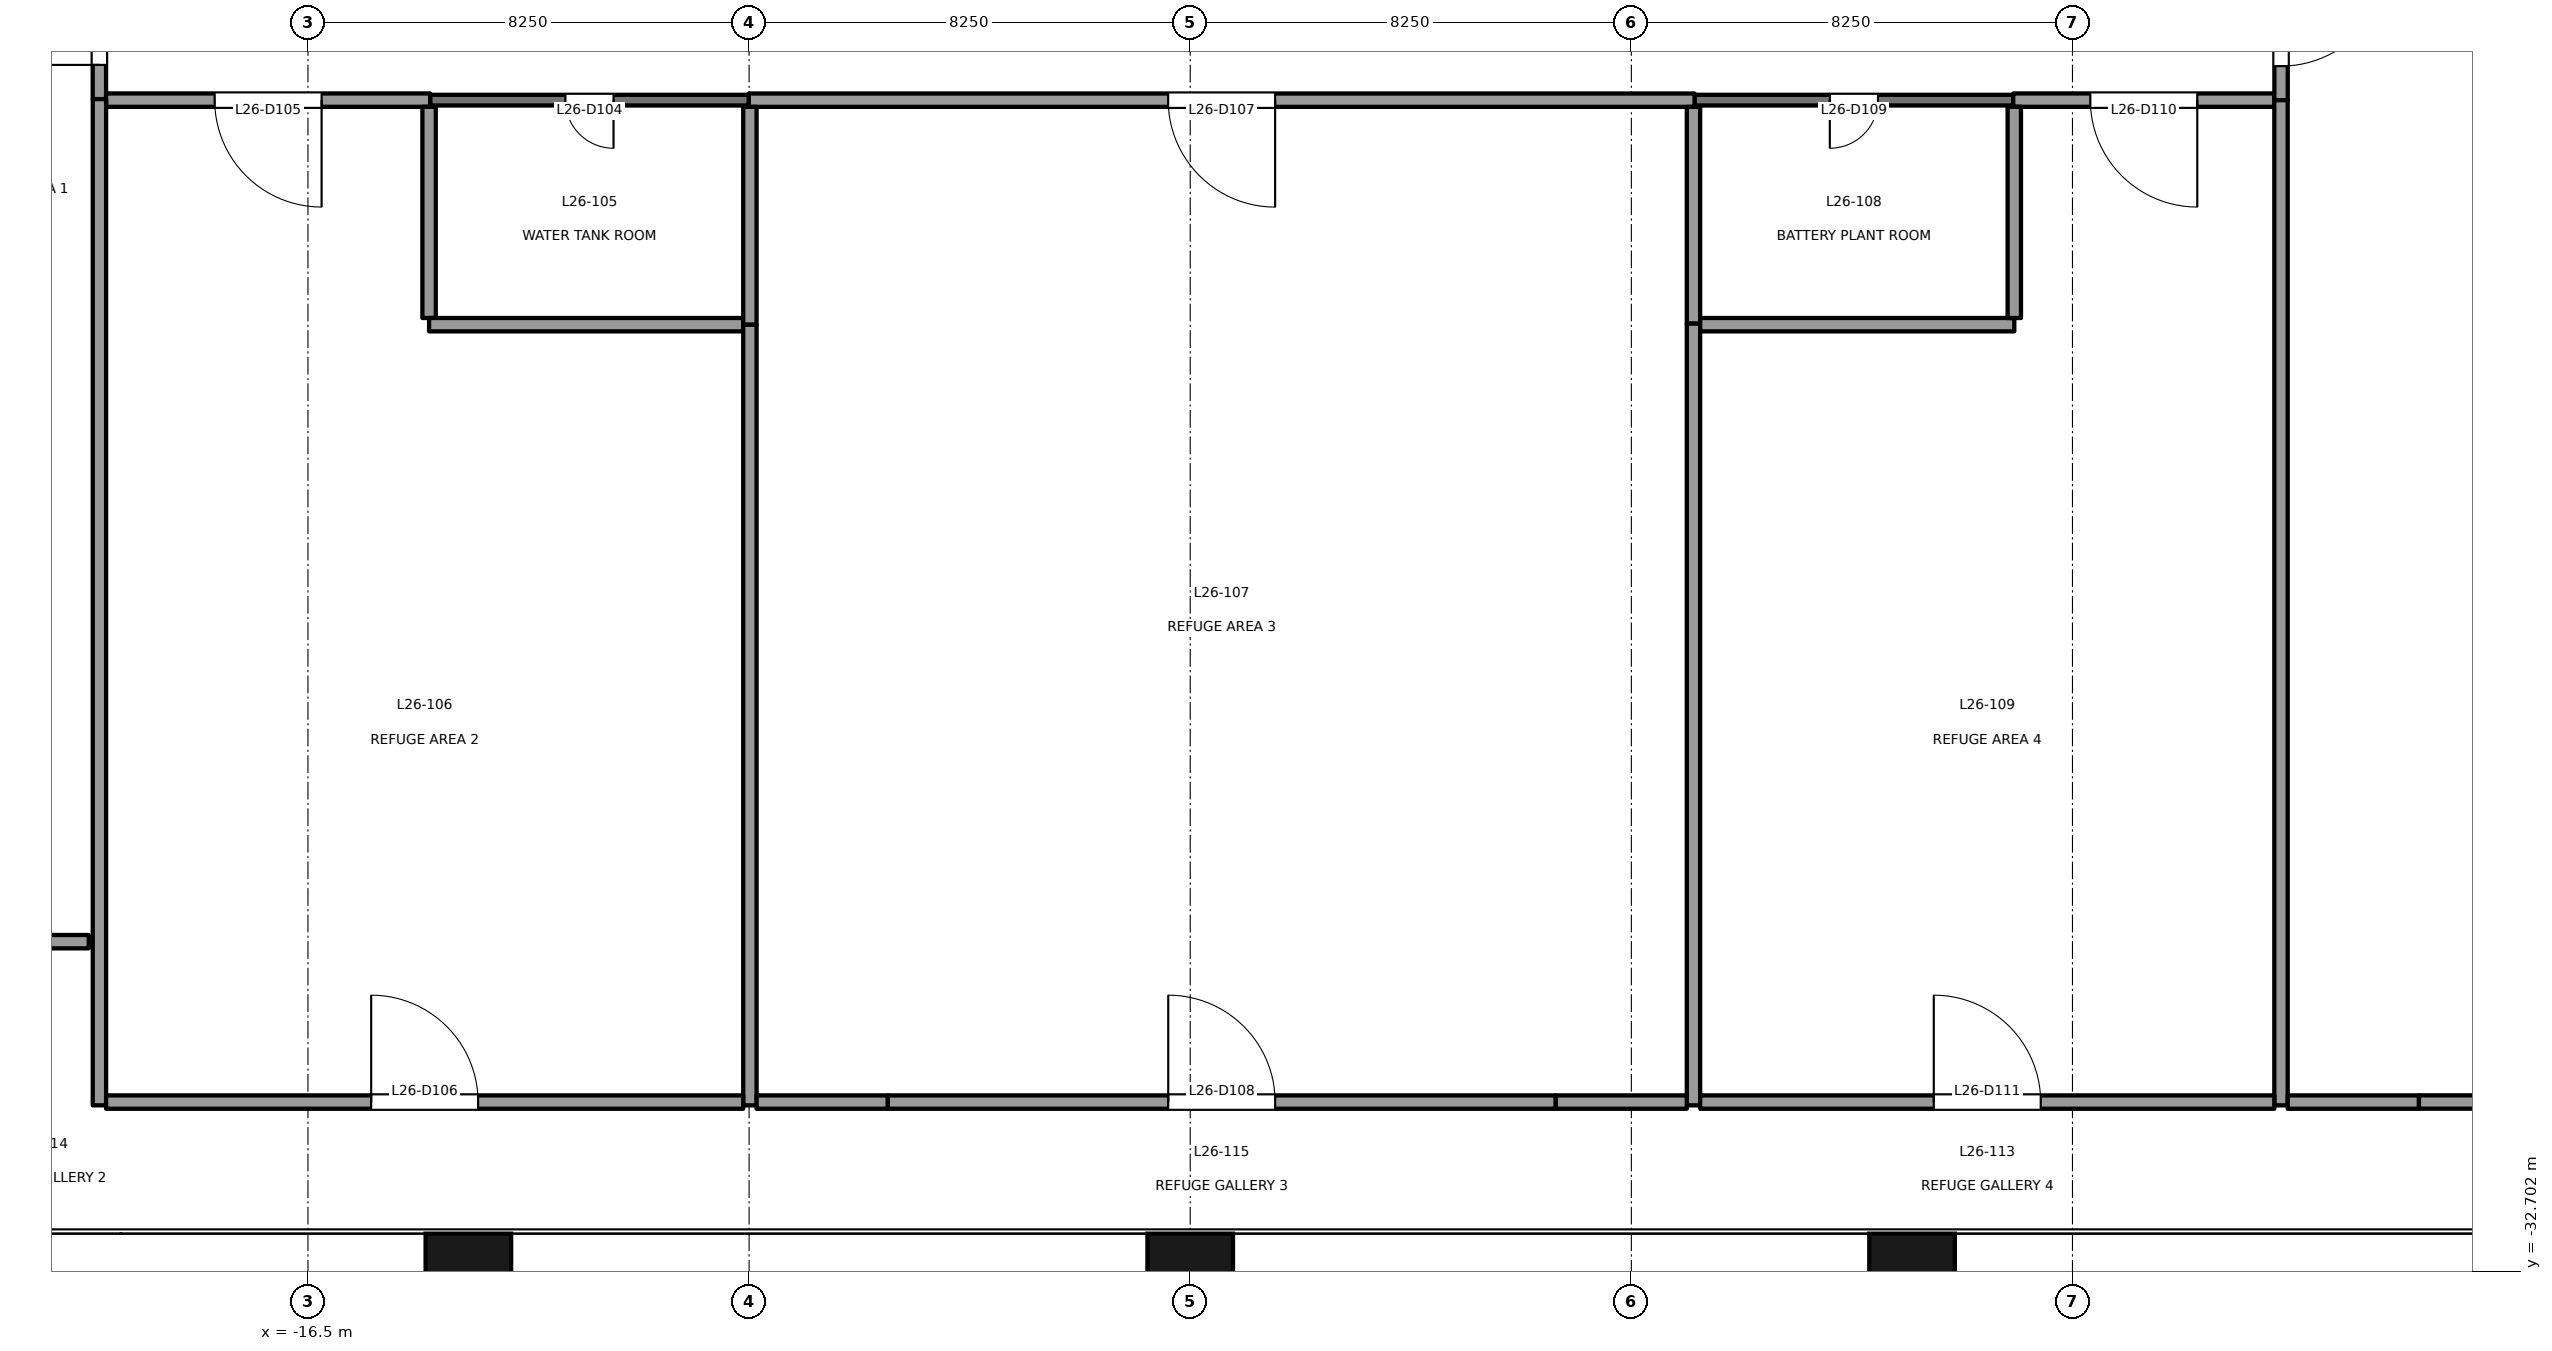
"""IFC4 building model, lengths in metres.
Left out: names, types, materials, properties, quantities, classifications, styles, units other than length and angle.
Written with IfcOpenShell. Run it as: python <this file> out.ifc"""

import sys

from ifc_helpers import new_model, si_unit, direction, frame, frame_2d, origin, origin_2d, place, context, subcontext, project, spatial, rectangle, extrude, element, fill, save


model = new_model("IFC4")
c1 = context("Model", 3, precision=1e-05, world=origin(), true_north=direction((0.0, 1.0)))
c2 = subcontext(c1, "Body", "Model", "MODEL_VIEW")
j1 = project(units=[si_unit("LENGTHUNIT", "METRE"), si_unit("PLANEANGLEUNIT", "RADIAN")], contexts=[c1])
p1 = place(None, origin())
s1 = spatial("IfcSite", under=j1, at=p1, CompositionType="ELEMENT")
p2 = place(p1, origin())
s2 = spatial("IfcBuilding", under=s1, at=p2, CompositionType="ELEMENT")
p3 = place(p2, frame((0.0, 0.0, 115.7)))
s3 = spatial("IfcBuildingStorey", under=s2, at=p3, CompositionType="ELEMENT", Elevation=115.7)
for number, where, z_axis, x_axis in (
    (1, (-13.5, -32.9, -0.2), (0.0, 0.0, 1.0), (1.0, 0.0, 0.0)),
    (2, (0.0, -32.9, -0.2), (0.0, 0.0, 1.0), (1.0, 0.0, 0.0)),
    (3, (13.5, -32.9, -0.2), (0.0, 0.0, 1.0), (1.0, 0.0, 0.0)),
):
    element("IfcColumn", number, at=place(p3, frame(where, z_axis=z_axis, x_axis=x_axis)), inside=s3, PredefinedType="COLUMN", context=c2, shape_type="SweptSolid", body=[
        extrude(rectangle(XDim=1.6, YDim=1.8, at=origin_2d()), origin(), (0.0, 0.0, 1.0), 5.0),
    ])
p4 = place(p3, frame((-20.401, -10.78, 0.0), z_axis=(0.0, 0.0, 1.0), x_axis=(0.0, 1.0, 0.0)))
e4 = element("IfcWall", 4, at=p4, inside=s3, PredefinedType="PARTITIONING", context=c2, shape_type="SweptSolid", body=[
    extrude(rectangle(XDim=3.28, YDim=0.25, at=frame_2d((1.64, 0.0))), origin(), (0.0, 0.0, 1.0), 4.8),
])
p5 = place(p4, frame((0.64, 0.0, 0.0)))
e5 = element("IfcOpeningElement", 5, at=p5, cuts=e4, PredefinedType="OPENING", context=c2, shape_type="SweptSolid", body=[
    extrude(rectangle(XDim=2.0, YDim=2.1, at=frame_2d((1.0, 1.05))), frame((0.0, 0.135, 0.0), z_axis=(0.0, -1.0, 0.0), x_axis=(1.0, 0.0, 0.0)), (0.0, 0.0, 1.0), 0.271),
])
p6 = place(p3, frame((-8.255, -10.799, 0.0), z_axis=(0.0, 0.0, 1.0), x_axis=(-1.0, 0.0, 0.0)))
e6 = element("IfcWall", 6, at=p6, inside=s3, PredefinedType="PARTITIONING", context=c2, shape_type="SweptSolid", body=[
    extrude(rectangle(XDim=5.96, YDim=0.2, at=frame_2d((2.98, 0.0))), origin(), (0.0, 0.0, 1.0), 3.9),
])
p7 = place(p6, frame((2.53, 0.0, 0.0)))
e7 = element("IfcOpeningElement", 7, at=p7, cuts=e6, PredefinedType="OPENING", context=c2, shape_type="SweptSolid", body=[
    extrude(rectangle(XDim=0.9, YDim=2.1, at=frame_2d((0.45, 1.05))), frame((0.0, 0.111, 0.0), z_axis=(0.0, -1.0, 0.0), x_axis=(1.0, 0.0, 0.0)), (0.0, 0.0, 1.0), 0.221),
])
p8 = place(p3, frame((-14.215, -10.799, 0.0), z_axis=(0.0, 0.0, 1.0), x_axis=(-1.0, 0.0, 0.0)))
e8 = element("IfcWall", 8, at=p8, inside=s3, PredefinedType="PARTITIONING", context=c2, shape_type="SweptSolid", body=[
    extrude(rectangle(XDim=6.06, YDim=0.25, at=frame_2d((3.03, 0.0))), origin(), (0.0, 0.0, 1.0), 4.8),
])
p9 = place(p8, frame((2.03, 0.0, 0.0)))
e9 = element("IfcOpeningElement", 9, at=p9, cuts=e8, PredefinedType="OPENING", context=c2, shape_type="SweptSolid", body=[
    extrude(rectangle(XDim=2.0, YDim=2.1, at=frame_2d((1.0, 1.05))), frame((0.0, 0.135, 0.0), z_axis=(0.0, -1.0, 0.0), x_axis=(1.0, 0.0, 0.0)), (0.0, 0.0, 1.0), 0.271),
])
p10 = place(p3, frame((9.432, -10.8, 0.0), z_axis=(0.0, 0.0, 1.0), x_axis=(-1.0, 0.0, 0.0)))
e10 = element("IfcWall", 10, at=p10, inside=s3, PredefinedType="PARTITIONING", context=c2, shape_type="SweptSolid", body=[
    extrude(rectangle(XDim=17.687, YDim=0.25, at=frame_2d((8.843, 0.0))), origin(), (0.0, 0.0, 1.0), 3.9),
])
p11 = place(p10, frame((7.844, 0.0, 0.0)))
e11 = element("IfcOpeningElement", 11, at=p11, cuts=e10, PredefinedType="OPENING", context=c2, shape_type="SweptSolid", body=[
    extrude(rectangle(XDim=2.0, YDim=2.1, at=frame_2d((1.0, 1.05))), frame((0.0, 0.135, 0.0), z_axis=(0.0, -1.0, 0.0), x_axis=(1.0, 0.0, 0.0)), (0.0, 0.0, 1.0), 0.271),
])
p12 = place(p3, frame((15.392, -10.799, 0.0), z_axis=(0.0, 0.0, 1.0), x_axis=(-1.0, 0.0, 0.0)))
e12 = element("IfcWall", 12, at=p12, inside=s3, PredefinedType="PARTITIONING", context=c2, shape_type="SweptSolid", body=[
    extrude(rectangle(XDim=5.96, YDim=0.2, at=frame_2d((2.98, 0.0))), origin(), (0.0, 0.0, 1.0), 3.9),
])
p13 = place(p12, frame((2.53, 0.0, 0.0)))
e13 = element("IfcOpeningElement", 13, at=p13, cuts=e12, PredefinedType="OPENING", context=c2, shape_type="SweptSolid", body=[
    extrude(rectangle(XDim=0.9, YDim=2.1, at=frame_2d((0.45, 1.05))), frame((0.0, 0.111, 0.0), z_axis=(0.0, -1.0, 0.0), x_axis=(1.0, 0.0, 0.0)), (0.0, 0.0, 1.0), 0.221),
])
p14 = place(p3, frame((20.275, -10.799, 0.0), z_axis=(0.0, 0.0, 1.0), x_axis=(-1.0, 0.0, 0.0)))
e14 = element("IfcWall", 14, at=p14, inside=s3, PredefinedType="PARTITIONING", context=c2, shape_type="SweptSolid", body=[
    extrude(rectangle(XDim=4.883, YDim=0.25, at=frame_2d((2.441, 0.0))), origin(), (0.0, 0.0, 1.0), 2.35),
])
p15 = place(p14, frame((1.441, 0.0, 0.0)))
e15 = element("IfcOpeningElement", 15, at=p15, cuts=e14, PredefinedType="OPENING", context=c2, shape_type="SweptSolid", body=[
    extrude(rectangle(XDim=2.0, YDim=2.1, at=frame_2d((1.0, 1.05))), frame((0.0, 0.135, 0.0), z_axis=(0.0, -1.0, 0.0), x_axis=(1.0, 0.0, 0.0)), (0.0, 0.0, 1.0), 0.271),
])
p16 = place(p3, frame((20.401, -7.526, 0.0), z_axis=(0.0, 0.0, 1.0), x_axis=(0.0, -1.0, 0.0)))
e16 = element("IfcWall", 16, at=p16, inside=s3, PredefinedType="PARTITIONING", context=c2, shape_type="SweptSolid", body=[
    extrude(rectangle(XDim=3.274, YDim=0.25, at=frame_2d((1.637, 0.0))), origin(), (0.0, 0.0, 1.0), 4.3),
])
p17 = place(p16, frame((0.637, 0.0, 0.0)))
e17 = element("IfcOpeningElement", 17, at=p17, cuts=e16, PredefinedType="OPENING", context=c2, shape_type="SweptSolid", body=[
    extrude(rectangle(XDim=2.0, YDim=2.1, at=frame_2d((1.0, 1.05))), frame((0.0, 0.135, 0.0), z_axis=(0.0, -1.0, 0.0), x_axis=(1.0, 0.0, 0.0)), (0.0, 0.0, 1.0), 0.271),
])
p18 = place(p3, frame((-20.4, -10.78, 0.0), z_axis=(0.0, 0.0, 1.0), x_axis=(0.0, -1.0, 0.0)))
e18 = element("IfcWall", 18, at=p18, inside=s3, PredefinedType="PARTITIONING", context=c2, shape_type="SweptSolid", body=[
    extrude(rectangle(XDim=18.82, YDim=0.25, at=frame_2d((9.41, 0.0))), origin(), (0.0, 0.0, 1.0), 4.8),
])
p19 = place(p3, frame((-20.6, -26.539, 0.0), z_axis=(0.0, 0.0, 1.0), x_axis=(-1.0, 0.0, 0.0)))
e19 = element("IfcWall", 19, at=p19, inside=s3, PredefinedType="PARTITIONING", context=c2, shape_type="SweptSolid", body=[
    extrude(rectangle(XDim=1.314, YDim=0.25, at=frame_2d((0.657, 0.0))), origin(), (0.0, 0.0, 1.0), 4.8),
])
p20 = place(p3, frame((-14.235, -14.874, 0.0), z_axis=(0.0, 0.0, 1.0), x_axis=(0.0, 1.0, 0.0)))
e20 = element("IfcWall", 20, at=p20, inside=s3, PredefinedType="PARTITIONING", context=c2, shape_type="SweptSolid", body=[
    extrude(rectangle(XDim=3.95, YDim=0.25, at=frame_2d((1.975, 0.0))), origin(), (0.0, 0.0, 1.0), 4.8),
])
p21 = place(p3, frame((-8.36, -14.999, 0.0), z_axis=(0.0, 0.0, 1.0), x_axis=(-1.0, 0.0, 0.0)))
e21 = element("IfcWall", 21, at=p21, inside=s3, PredefinedType="PARTITIONING", context=c2, shape_type="SweptSolid", body=[
    extrude(rectangle(XDim=5.875, YDim=0.25, at=frame_2d((2.938, 0.0))), origin(), (0.0, 0.0, 1.0), 3.9),
])
p22 = place(p3, frame((-8.235, -10.925, 0.0), z_axis=(0.0, 0.0, 1.0), x_axis=(0.0, -1.0, 0.0)))
e22 = element("IfcWall", 22, at=p22, inside=s3, PredefinedType="PARTITIONING", context=c2, shape_type="SweptSolid", body=[
    extrude(rectangle(XDim=4.075, YDim=0.25, at=frame_2d((2.038, 0.0))), origin(), (0.0, 0.0, 1.0), 4.8),
])
p23 = place(p3, frame((-8.235, -15.0, 0.0), z_axis=(0.0, 0.0, 1.0), x_axis=(0.0, -1.0, 0.0)))
e23 = element("IfcWall", 23, at=p23, inside=s3, PredefinedType="PARTITIONING", context=c2, shape_type="SweptSolid", body=[
    extrude(rectangle(XDim=14.6, YDim=0.25, at=frame_2d((7.3, 0.0))), origin(), (0.0, 0.0, 1.0), 3.7),
])
p24 = place(p3, frame((-20.275, -29.539, 0.0), z_axis=(0.0, 0.0, 1.0), x_axis=(1.0, 0.0, 0.0)))
e24 = element("IfcWall", 24, at=p24, inside=s3, PredefinedType="PARTITIONING", context=c2, shape_type="SweptSolid", body=[
    extrude(rectangle(XDim=11.915, YDim=0.25, at=frame_2d((5.958, 0.0))), origin(), (0.0, 0.0, 1.0), 2.75),
])
p25 = place(p24, frame((4.957, 0.0, 0.0)))
e25 = element("IfcOpeningElement", 25, at=p25, cuts=e24, PredefinedType="OPENING", context=c2, shape_type="SweptSolid", body=[
    extrude(rectangle(XDim=2.0, YDim=2.1, at=frame_2d((1.0, 1.05))), frame((0.0, 0.135, 0.0), z_axis=(0.0, -1.0, 0.0), x_axis=(1.0, 0.0, 0.0)), (0.0, 0.0, 1.0), 0.271),
])
p26 = place(p3, frame((9.412, -10.925, 0.0), z_axis=(0.0, 0.0, 1.0), x_axis=(0.0, -1.0, 0.0)))
e26 = element("IfcWall", 26, at=p26, inside=s3, PredefinedType="PARTITIONING", context=c2, shape_type="SweptSolid", body=[
    extrude(rectangle(XDim=4.055, YDim=0.25, at=frame_2d((2.027, 0.0))), origin(), (0.0, 0.0, 1.0), 4.8),
])
p27 = place(p3, frame((9.412, -14.98, 0.0), z_axis=(0.0, 0.0, 1.0), x_axis=(0.0, -1.0, 0.0)))
e27 = element("IfcWall", 27, at=p27, inside=s3, PredefinedType="PARTITIONING", context=c2, shape_type="SweptSolid", body=[
    extrude(rectangle(XDim=14.62, YDim=0.25, at=frame_2d((7.31, 0.0))), origin(), (0.0, 0.0, 1.0), 3.7),
])
for number, where, z_axis, x_axis in (
    (28, (9.287, -29.539, 0.0), (0.0, 0.0, 1.0), (-1.0, 0.0, 0.0)),
    (29, (-5.655, -29.539, 0.0), (0.0, 0.0, 1.0), (-1.0, 0.0, 0.0)),
):
    element("IfcWall", number, at=place(p3, frame(where, z_axis=z_axis, x_axis=x_axis)), inside=s3, PredefinedType="PARTITIONING", context=c2, shape_type="SweptSolid", body=[
        extrude(rectangle(XDim=2.455, YDim=0.25, at=frame_2d((1.228, 0.0))), origin(), (0.0, 0.0, 1.0), 3.7),
    ])
p28 = place(p3, frame((-5.655, -29.539, 0.0), z_axis=(0.0, 0.0, 1.0), x_axis=(1.0, 0.0, 0.0)))
e30 = element("IfcWall", 30, at=p28, inside=s3, PredefinedType="PARTITIONING", context=c2, shape_type="SweptSolid", body=[
    extrude(rectangle(XDim=12.487, YDim=0.25, at=frame_2d((6.244, 0.0))), origin(), (0.0, 0.0, 1.0), 2.75),
])
p29 = place(p28, frame((5.244, 0.0, 0.0)))
e31 = element("IfcOpeningElement", 31, at=p29, cuts=e30, PredefinedType="OPENING", context=c2, shape_type="SweptSolid", body=[
    extrude(rectangle(XDim=2.0, YDim=2.1, at=frame_2d((1.0, 1.05))), frame((0.0, 0.135, 0.0), z_axis=(0.0, -1.0, 0.0), x_axis=(1.0, 0.0, 0.0)), (0.0, 0.0, 1.0), 0.271),
])
p30 = place(p3, frame((15.412, -14.999, 0.0), z_axis=(0.0, 0.0, 1.0), x_axis=(-1.0, 0.0, 0.0)))
e32 = element("IfcWall", 32, at=p30, inside=s3, PredefinedType="PARTITIONING", context=c2, shape_type="SweptSolid", body=[
    extrude(rectangle(XDim=5.875, YDim=0.25, at=frame_2d((2.938, 0.0))), origin(), (0.0, 0.0, 1.0), 3.9),
])
p31 = place(p3, frame((15.412, -10.924, 0.0), z_axis=(0.0, 0.0, 1.0), x_axis=(0.0, -1.0, 0.0)))
e33 = element("IfcWall", 33, at=p31, inside=s3, PredefinedType="PARTITIONING", context=c2, shape_type="SweptSolid", body=[
    extrude(rectangle(XDim=3.95, YDim=0.25, at=frame_2d((1.975, 0.0))), origin(), (0.0, 0.0, 1.0), 4.8),
])
p32 = place(p3, frame((20.4, -10.8, 0.0), z_axis=(0.0, 0.0, 1.0), x_axis=(0.0, -1.0, 0.0)))
e34 = element("IfcWall", 34, at=p32, inside=s3, PredefinedType="PARTITIONING", context=c2, shape_type="SweptSolid", body=[
    extrude(rectangle(XDim=18.8, YDim=0.25, at=frame_2d((9.4, 0.0))), origin(), (0.0, 0.0, 1.0), 2.75),
])
p33 = place(p3, frame((9.537, -29.539, 0.0), z_axis=(0.0, 0.0, 1.0), x_axis=(1.0, 0.0, 0.0)))
e35 = element("IfcWall", 35, at=p33, inside=s3, PredefinedType="PARTITIONING", context=c2, shape_type="SweptSolid", body=[
    extrude(rectangle(XDim=10.738, YDim=0.25, at=frame_2d((5.369, 0.0))), origin(), (0.0, 0.0, 1.0), 2.35),
])
p34 = place(p33, frame((4.369, 0.0, 0.0)))
e36 = element("IfcOpeningElement", 36, at=p34, cuts=e35, PredefinedType="OPENING", context=c2, shape_type="SweptSolid", body=[
    extrude(rectangle(XDim=2.0, YDim=2.1, at=frame_2d((1.0, 1.05))), frame((0.0, 0.135, 0.0), z_axis=(0.0, -1.0, 0.0), x_axis=(1.0, 0.0, 0.0)), (0.0, 0.0, 1.0), 0.271),
])
p35 = place(p3, frame((22.98, -29.539, 0.0), z_axis=(0.0, 0.0, 1.0), x_axis=(-1.0, 0.0, 0.0)))
e37 = element("IfcWall", 37, at=p35, inside=s3, PredefinedType="PARTITIONING", context=c2, shape_type="SweptSolid", body=[
    extrude(rectangle(XDim=2.455, YDim=0.25, at=frame_2d((1.228, 0.0))), origin(), (0.0, 0.0, 1.0), 4.8),
])
p36 = place(p3, frame((30.6, -29.538, 0.0), z_axis=(0.0, 0.0, 1.0), x_axis=(-1.0, 0.0, 0.0)))
e38 = element("IfcWall", 38, at=p36, inside=s3, PredefinedType="PARTITIONING", context=c2, shape_type="SweptSolid", body=[
    extrude(rectangle(XDim=7.62, YDim=0.25, at=frame_2d((3.81, 0.0))), origin(), (0.0, 0.0, 1.0), 4.8),
])
p37 = place(p5, origin())
e39 = element("IfcDoor", 39, at=p37, inside=s3, OperationType="DOUBLE_DOOR_SINGLE_SWING", PredefinedType="DOOR", context=c2, shape_type="SweptSolid", body=[
    extrude(rectangle(XDim=2.0, YDim=2.1, at=frame_2d((1.0, 1.05))), frame((0.0, 0.025, 0.0), z_axis=(0.0, -1.0, 0.0), x_axis=(1.0, 0.0, 0.0)), (0.0, 0.0, 1.0), 0.05),
])
fill(e5, e39)
p38 = place(p7, origin())
e40 = element("IfcDoor", 40, at=p38, inside=s3, OperationType="SINGLE_SWING_LEFT", PredefinedType="DOOR", context=c2, shape_type="SweptSolid", body=[
    extrude(rectangle(XDim=0.9, YDim=2.1, at=frame_2d((0.45, 1.05))), frame((0.0, 0.025, 0.0), z_axis=(0.0, -1.0, 0.0), x_axis=(1.0, 0.0, 0.0)), (0.0, 0.0, 1.0), 0.05),
])
fill(e7, e40)
p39 = place(p9, origin())
e41 = element("IfcDoor", 41, at=p39, inside=s3, OperationType="DOUBLE_DOOR_SINGLE_SWING", PredefinedType="DOOR", context=c2, shape_type="SweptSolid", body=[
    extrude(rectangle(XDim=2.0, YDim=2.1, at=frame_2d((1.0, 1.05))), frame((0.0, 0.025, 0.0), z_axis=(0.0, -1.0, 0.0), x_axis=(1.0, 0.0, 0.0)), (0.0, 0.0, 1.0), 0.05),
])
fill(e9, e41)
p40 = place(p25, origin())
e42 = element("IfcDoor", 42, at=p40, inside=s3, OperationType="DOUBLE_DOOR_SINGLE_SWING", PredefinedType="DOOR", context=c2, shape_type="SweptSolid", body=[
    extrude(rectangle(XDim=2.0, YDim=2.1, at=frame_2d((1.0, 1.05))), frame((0.0, 0.025, 0.0), z_axis=(0.0, -1.0, 0.0), x_axis=(1.0, 0.0, 0.0)), (0.0, 0.0, 1.0), 0.05),
])
fill(e25, e42)
p41 = place(p11, origin())
e43 = element("IfcDoor", 43, at=p41, inside=s3, OperationType="DOUBLE_DOOR_SINGLE_SWING", PredefinedType="DOOR", context=c2, shape_type="SweptSolid", body=[
    extrude(rectangle(XDim=2.0, YDim=2.1, at=frame_2d((1.0, 1.05))), frame((0.0, 0.025, 0.0), z_axis=(0.0, -1.0, 0.0), x_axis=(1.0, 0.0, 0.0)), (0.0, 0.0, 1.0), 0.05),
])
fill(e11, e43)
p42 = place(p29, origin())
e44 = element("IfcDoor", 44, at=p42, inside=s3, OperationType="DOUBLE_DOOR_SINGLE_SWING", PredefinedType="DOOR", context=c2, shape_type="SweptSolid", body=[
    extrude(rectangle(XDim=2.0, YDim=2.1, at=frame_2d((1.0, 1.05))), frame((0.0, 0.025, 0.0), z_axis=(0.0, -1.0, 0.0), x_axis=(1.0, 0.0, 0.0)), (0.0, 0.0, 1.0), 0.05),
])
fill(e31, e44)
p43 = place(p13, origin())
e45 = element("IfcDoor", 45, at=p43, inside=s3, OperationType="SINGLE_SWING_RIGHT", PredefinedType="DOOR", context=c2, shape_type="SweptSolid", body=[
    extrude(rectangle(XDim=0.9, YDim=2.1, at=frame_2d((0.45, 1.05))), frame((0.0, 0.025, 0.0), z_axis=(0.0, -1.0, 0.0), x_axis=(1.0, 0.0, 0.0)), (0.0, 0.0, 1.0), 0.05),
])
fill(e13, e45)
p44 = place(p15, origin())
e46 = element("IfcDoor", 46, at=p44, inside=s3, OperationType="DOUBLE_DOOR_SINGLE_SWING", PredefinedType="DOOR", context=c2, shape_type="SweptSolid", body=[
    extrude(rectangle(XDim=2.0, YDim=2.1, at=frame_2d((1.0, 1.05))), frame((0.0, 0.025, 0.0), z_axis=(0.0, -1.0, 0.0), x_axis=(1.0, 0.0, 0.0)), (0.0, 0.0, 1.0), 0.05),
])
fill(e15, e46)
p45 = place(p34, origin())
e47 = element("IfcDoor", 47, at=p45, inside=s3, OperationType="DOUBLE_DOOR_SINGLE_SWING", PredefinedType="DOOR", context=c2, shape_type="SweptSolid", body=[
    extrude(rectangle(XDim=2.0, YDim=2.1, at=frame_2d((1.0, 1.05))), frame((0.0, 0.025, 0.0), z_axis=(0.0, -1.0, 0.0), x_axis=(1.0, 0.0, 0.0)), (0.0, 0.0, 1.0), 0.05),
])
fill(e36, e47)
p46 = place(p17, origin())
e48 = element("IfcDoor", 48, at=p46, inside=s3, OperationType="DOUBLE_DOOR_SINGLE_SWING", PredefinedType="DOOR", context=c2, shape_type="SweptSolid", body=[
    extrude(rectangle(XDim=2.0, YDim=2.1, at=frame_2d((1.0, 1.05))), frame((0.0, 0.025, 0.0), z_axis=(0.0, -1.0, 0.0), x_axis=(1.0, 0.0, 0.0)), (0.0, 0.0, 1.0), 0.05),
])
fill(e17, e48)
save(model, sys.argv[1])
